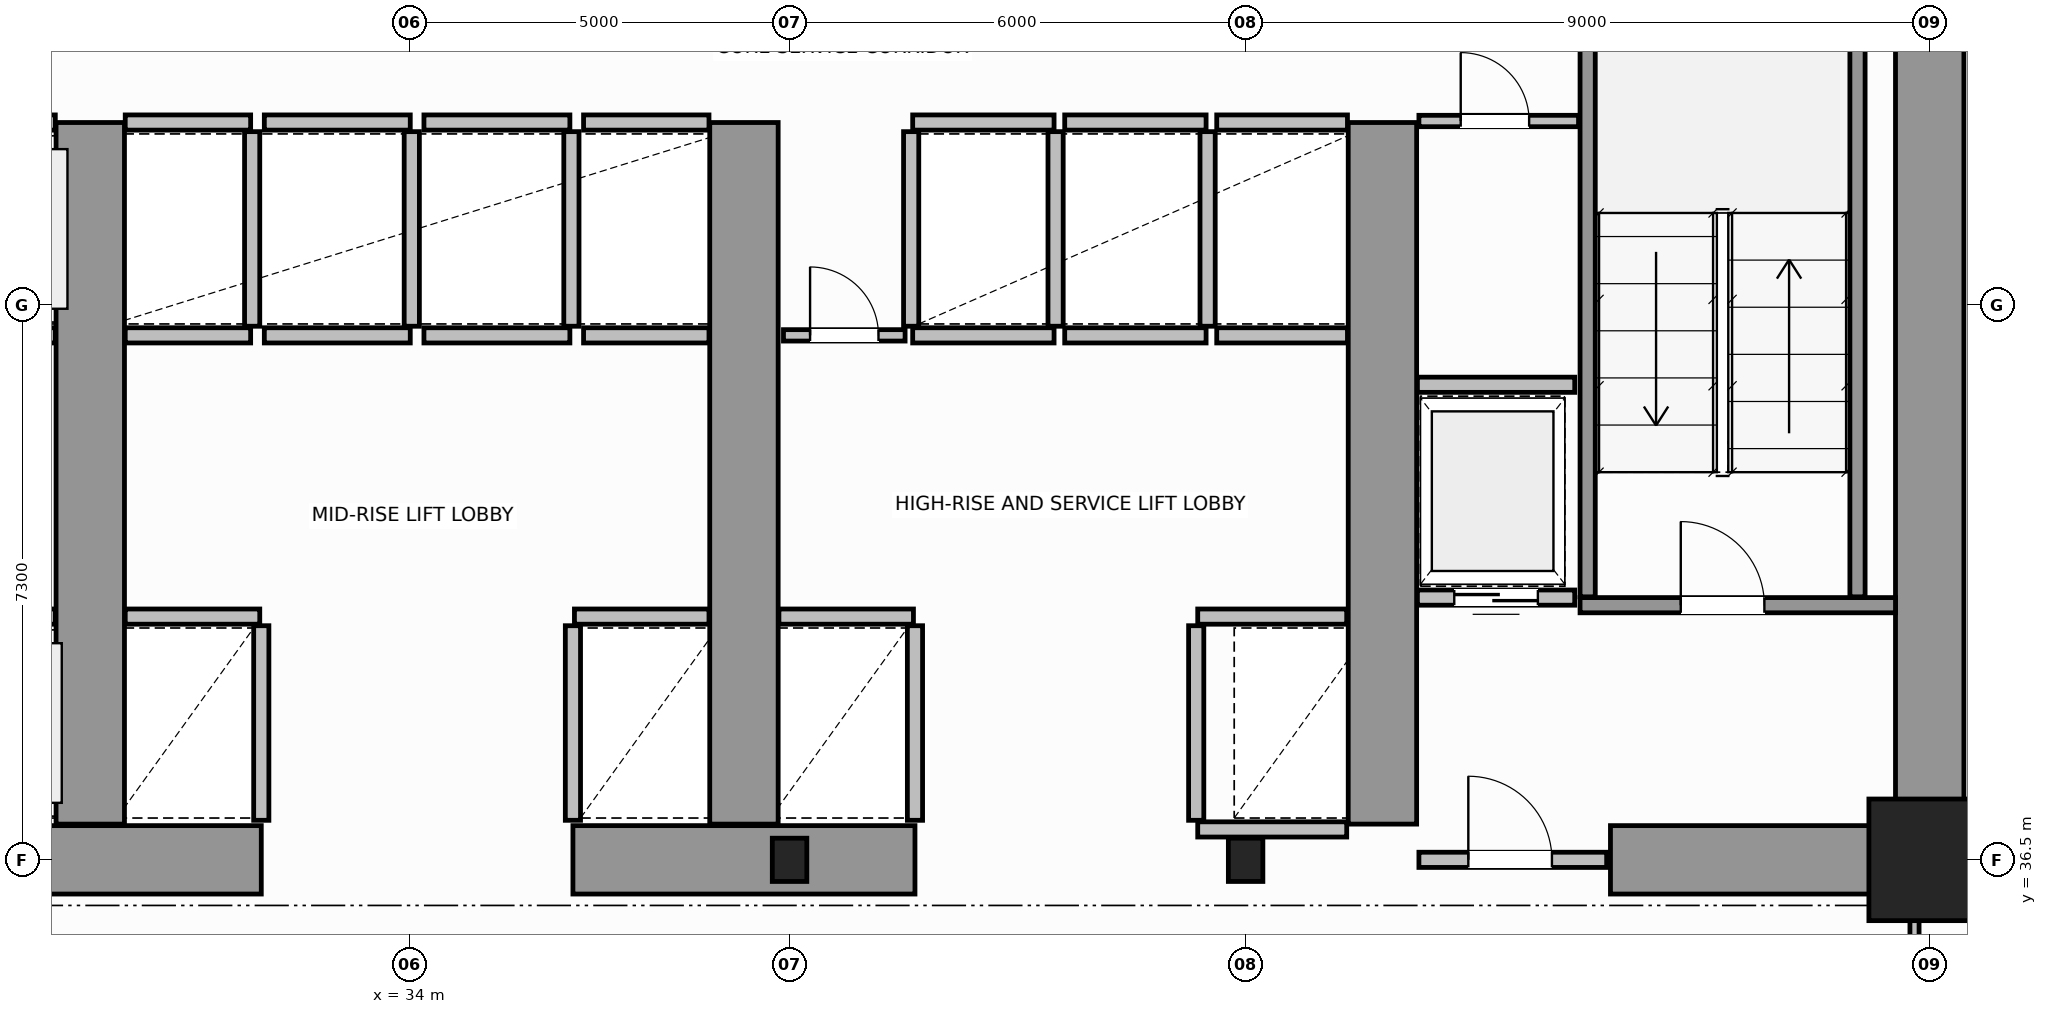
"""IFC4 building model, lengths in metres.
Left out: names, types, materials, properties, quantities, classifications, styles, units other than length and angle.
Written with IfcOpenShell. Run it as: python <this file> out.ifc"""

import sys

from ifc_helpers import new_model, si_unit, direction, frame, frame_2d, origin, origin_2d, place, context, subcontext, project, spatial, rectangle, i_section, extrude, source, transform, mapped, element, fill, save


model = new_model("IFC4")
c1 = context("Model", 3, precision=1e-05, world=origin(), true_north=direction((0.0, 1.0)))
c2 = subcontext(c1, "Body", "Model", "MODEL_VIEW")
j1 = project(units=[si_unit("LENGTHUNIT", "METRE"), si_unit("PLANEANGLEUNIT", "RADIAN")], contexts=[c1])
p1 = place(None, origin())
s1 = spatial("IfcSite", under=j1, at=p1, CompositionType="ELEMENT")
p2 = place(p1, origin())
s2 = spatial("IfcBuilding", under=s1, at=p2, CompositionType="ELEMENT")
p3 = place(p2, frame((0.0, 0.0, 56.8)))
s3 = spatial("IfcBuildingStorey", under=s2, at=p3, CompositionType="ELEMENT", Elevation=56.8)
m1 = source(origin(), c2, "Body", "SweptSolid", [
    extrude(i_section(OverallWidth=0.454, OverallDepth=0.569, WebThickness=0.078, FlangeThickness=0.08, FilletRadius=0.015, at=origin_2d()), origin(), (0.0, 0.0, 1.0), 3.8),
])
for number, where, z_axis, x_axis in (
    (1, (39.0, 36.5, 0.0), (0.0, 0.0, 1.0), (1.0, 0.0, 0.0)),
    (2, (45.0, 36.5, 0.0), (0.0, 0.0, 1.0), (1.0, 0.0, 0.0)),
):
    element("IfcColumn", number, at=place(p3, frame(where, z_axis=z_axis, x_axis=x_axis)), inside=s3, PredefinedType="COLUMN", context=c2, shape_type="MappedRepresentation", body=[
        mapped(m1, transform((0.0, 0.0, 0.0), scale=1.0)),
    ])
m2 = source(origin(), c2, "Body", "SweptSolid", [
    extrude(rectangle(XDim=1.6, YDim=1.6, at=origin_2d()), origin(), (0.0, 0.0, 1.0), 3.8),
])
p4 = place(p3, frame((54.0, 36.5, 0.0), z_axis=(0.0, 0.0, 1.0), x_axis=(1.0, 0.0, 0.0)))
e3 = element("IfcColumn", 3, at=p4, inside=s3, PredefinedType="COLUMN", context=c2, shape_type="MappedRepresentation", body=[
    mapped(m2, transform((0.0, 0.0, 0.0), scale=1.0)),
])
p5 = place(p3, frame((54.0, 36.5, 0.0), z_axis=(0.0, 0.0, 1.0), x_axis=(0.0, 1.0, 0.0)))
e4 = element("IfcWall", 4, at=p5, inside=s3, PredefinedType="SHEAR", context=c2, shape_type="SweptSolid", body=[
    extrude(rectangle(XDim=14.5, YDim=0.9, at=frame_2d((7.25, 0.0))), origin(), (0.0, 0.0, 1.0), 3.8),
])
for number, where, z_axis, x_axis in (
    (5, (27.55, 36.5, 0.0), (0.0, 0.0, 1.0), (1.0, 0.0, 0.0)),
    (6, (36.15, 36.5, 0.0), (0.0, 0.0, 1.0), (1.0, 0.0, 0.0)),
):
    element("IfcWall", number, at=place(p3, frame(where, z_axis=z_axis, x_axis=x_axis)), inside=s3, PredefinedType="SHEAR", context=c2, shape_type="SweptSolid", body=[
        extrude(rectangle(XDim=4.5, YDim=0.9, at=frame_2d((2.25, 0.0))), origin(), (0.0, 0.0, 1.0), 3.8),
    ])
p6 = place(p3, frame((49.8, 36.5, 0.0), z_axis=(0.0, 0.0, 1.0), x_axis=(1.0, 0.0, 0.0)))
e7 = element("IfcWall", 7, at=p6, inside=s3, PredefinedType="SHEAR", context=c2, shape_type="SweptSolid", body=[
    extrude(rectangle(XDim=3.73, YDim=0.9, at=frame_2d((1.865, 0.0))), origin(), (0.0, 0.0, 1.0), 2.38),
])
for number, where, z_axis, x_axis in (
    (8, (29.8, 36.97, 0.0), (0.0, 0.0, 1.0), (0.0, 1.0, 0.0)),
    (9, (38.4, 36.97, 0.0), (0.0, 0.0, 1.0), (0.0, 1.0, 0.0)),
    (10, (46.8, 36.97, 0.0), (0.0, 0.0, 1.0), (0.0, 1.0, 0.0)),
):
    element("IfcWall", number, at=place(p3, frame(where, z_axis=z_axis, x_axis=x_axis)), inside=s3, PredefinedType="SHEAR", context=c2, shape_type="SweptSolid", body=[
        extrude(rectangle(XDim=9.23, YDim=0.9, at=frame_2d((4.615, 0.0))), origin(), (0.0, 0.0, 1.0), 3.8),
    ])
p7 = place(p3, frame((49.4, 39.85, 0.0), z_axis=(0.0, 0.0, 1.0), x_axis=(1.0, 0.0, 0.0)))
e11 = element("IfcWall", 11, at=p7, inside=s3, PredefinedType="SOLIDWALL", context=c2, shape_type="SweptSolid", body=[
    extrude(rectangle(XDim=4.15, YDim=0.2, at=frame_2d((2.075, 0.0))), origin(), (0.0, 0.0, 1.0), 3.8),
])
p8 = place(p7, frame((1.325, 0.0, 0.0)))
e12 = element("IfcOpeningElement", 12, at=p8, cuts=e11, PredefinedType="OPENING", context=c2, shape_type="SweptSolid", body=[
    extrude(rectangle(XDim=1.1, YDim=2.15, at=frame_2d((0.55, 1.075))), frame((0.0, 0.11, 0.0), z_axis=(0.0, -1.0, 0.0), x_axis=(1.0, 0.0, 0.0)), (0.0, 0.0, 1.0), 0.22),
])
for number, where, z_axis, x_axis in (
    (13, (49.5, 39.96, 0.0), (0.0, 0.0, 1.0), (0.0, 1.0, 0.0)),
    (14, (53.05, 39.96, 0.0), (0.0, 0.0, 1.0), (0.0, 1.0, 0.0)),
):
    element("IfcWall", number, at=place(p3, frame(where, z_axis=z_axis, x_axis=x_axis)), inside=s3, PredefinedType="SOLIDWALL", context=c2, shape_type="SweptSolid", body=[
        extrude(rectangle(XDim=9.93, YDim=0.2, at=frame_2d((4.965, 0.0))), origin(), (0.0, 0.0, 1.0), 3.8),
    ])
p9 = place(p3, frame((47.28, 36.5, 0.0), z_axis=(0.0, 0.0, 1.0), x_axis=(1.0, 0.0, 0.0)))
e15 = element("IfcWall", 15, at=p9, inside=s3, PredefinedType="SOLIDWALL", context=c2, shape_type="SweptSolid", body=[
    extrude(rectangle(XDim=2.47, YDim=0.2, at=frame_2d((1.235, 0.0))), origin(), (0.0, 0.0, 1.0), 2.37),
])
p10 = place(p9, frame((0.65, 0.0, 0.0)))
e16 = element("IfcOpeningElement", 16, at=p10, cuts=e15, PredefinedType="OPENING", context=c2, shape_type="SweptSolid", body=[
    extrude(rectangle(XDim=1.1, YDim=2.15, at=frame_2d((0.55, 1.075))), frame((0.0, 0.11, 0.0), z_axis=(0.0, -1.0, 0.0), x_axis=(1.0, 0.0, 0.0)), (0.0, 0.0, 1.0), 0.22),
])
p11 = place(p3, frame((27.57, 39.7, 0.0), z_axis=(0.0, 0.0, 1.0), x_axis=(1.0, 0.0, 0.0)))
e17 = element("IfcWall", 17, at=p11, inside=s3, PredefinedType="SOLIDWALL", context=c2, shape_type="SweptSolid", body=[
    extrude(rectangle(XDim=1.77, YDim=0.2, at=frame_2d((0.885, 0.0))), origin(), (0.0, 0.0, 1.0), 3.58),
])
p12 = place(p11, frame((0.335, 0.0, 0.0)))
e18 = element("IfcOpeningElement", 18, at=p12, cuts=e17, PredefinedType="OPENING", context=c2, shape_type="SweptSolid", body=[
    extrude(rectangle(XDim=1.1, YDim=2.15, at=frame_2d((0.55, 1.075))), frame((0.0, 0.11, 0.0), z_axis=(0.0, -1.0, 0.0), x_axis=(1.0, 0.0, 0.0)), (0.0, 0.0, 1.0), 0.22),
])
p13 = place(p3, frame((27.69, 43.4, 0.0), z_axis=(0.0, 0.0, 1.0), x_axis=(1.0, 0.0, 0.0)))
e19 = element("IfcWall", 19, at=p13, inside=s3, PredefinedType="SOLIDWALL", context=c2, shape_type="SweptSolid", body=[
    extrude(rectangle(XDim=1.65, YDim=0.2, at=frame_2d((0.825, 0.0))), origin(), (0.0, 0.0, 1.0), 3.58),
])
p14 = place(p13, frame((0.275, 0.0, 0.0)))
e20 = element("IfcOpeningElement", 20, at=p14, cuts=e19, PredefinedType="OPENING", context=c2, shape_type="SweptSolid", body=[
    extrude(rectangle(XDim=1.1, YDim=2.15, at=frame_2d((0.55, 1.075))), frame((0.0, 0.11, 0.0), z_axis=(0.0, -1.0, 0.0), x_axis=(1.0, 0.0, 0.0)), (0.0, 0.0, 1.0), 0.22),
])
p15 = place(p3, frame((27.69, 46.2, 0.0), z_axis=(0.0, 0.0, 1.0), x_axis=(1.0, 0.0, 0.0)))
e21 = element("IfcWall", 21, at=p15, inside=s3, PredefinedType="SOLIDWALL", context=c2, shape_type="SweptSolid", body=[
    extrude(rectangle(XDim=1.65, YDim=0.2, at=frame_2d((0.825, 0.0))), origin(), (0.0, 0.0, 1.0), 3.58),
])
p16 = place(p3, frame((30.26, 39.7, 0.0), z_axis=(0.0, 0.0, 1.0), x_axis=(1.0, 0.0, 0.0)))
e22 = element("IfcWall", 22, at=p16, inside=s3, PredefinedType="SOLIDWALL", context=c2, shape_type="SweptSolid", body=[
    extrude(rectangle(XDim=1.77, YDim=0.2, at=frame_2d((0.885, 0.0))), origin(), (0.0, 0.0, 1.0), 3.58),
])
p17 = place(p3, frame((32.05, 37.02, 0.0), z_axis=(0.0, 0.0, 1.0), x_axis=(0.0, 1.0, 0.0)))
e23 = element("IfcWall", 23, at=p17, inside=s3, PredefinedType="SOLIDWALL", context=c2, shape_type="SweptSolid", body=[
    extrude(rectangle(XDim=2.56, YDim=0.2, at=frame_2d((1.28, 0.0))), origin(), (0.0, 0.0, 1.0), 3.58),
])
p18 = place(p3, frame((36.17, 39.7, 0.0), z_axis=(0.0, 0.0, 1.0), x_axis=(1.0, 0.0, 0.0)))
e24 = element("IfcWall", 24, at=p18, inside=s3, PredefinedType="SOLIDWALL", context=c2, shape_type="SweptSolid", body=[
    extrude(rectangle(XDim=1.77, YDim=0.2, at=frame_2d((0.885, 0.0))), origin(), (0.0, 0.0, 1.0), 3.58),
])
p19 = place(p3, frame((36.15, 37.02, 0.0), z_axis=(0.0, 0.0, 1.0), x_axis=(0.0, 1.0, 0.0)))
e25 = element("IfcWall", 25, at=p19, inside=s3, PredefinedType="SOLIDWALL", context=c2, shape_type="SweptSolid", body=[
    extrude(rectangle(XDim=2.56, YDim=0.2, at=frame_2d((1.28, 0.0))), origin(), (0.0, 0.0, 1.0), 3.58),
])
for number, where, z_axis, x_axis in (
    (26, (30.26, 43.4, 0.0), (0.0, 0.0, 1.0), (1.0, 0.0, 0.0)),
    (27, (30.26, 46.2, 0.0), (0.0, 0.0, 1.0), (1.0, 0.0, 0.0)),
):
    element("IfcWall", number, at=place(p3, frame(where, z_axis=z_axis, x_axis=x_axis)), inside=s3, PredefinedType="SOLIDWALL", context=c2, shape_type="SweptSolid", body=[
        extrude(rectangle(XDim=1.65, YDim=0.2, at=frame_2d((0.825, 0.0))), origin(), (0.0, 0.0, 1.0), 3.58),
    ])
p20 = place(p3, frame((31.93, 43.52, 0.0), z_axis=(0.0, 0.0, 1.0), x_axis=(0.0, 1.0, 0.0)))
e28 = element("IfcWall", 28, at=p20, inside=s3, PredefinedType="SOLIDWALL", context=c2, shape_type="SweptSolid", body=[
    extrude(rectangle(XDim=2.56, YDim=0.2, at=frame_2d((1.28, 0.0))), origin(), (0.0, 0.0, 1.0), 3.58),
])
for number, where, z_axis, x_axis in (
    (29, (32.09, 43.4, 0.0), (0.0, 0.0, 1.0), (1.0, 0.0, 0.0)),
    (30, (32.09, 46.2, 0.0), (0.0, 0.0, 1.0), (1.0, 0.0, 0.0)),
):
    element("IfcWall", number, at=place(p3, frame(where, z_axis=z_axis, x_axis=x_axis)), inside=s3, PredefinedType="SOLIDWALL", context=c2, shape_type="SweptSolid", body=[
        extrude(rectangle(XDim=1.92, YDim=0.2, at=frame_2d((0.96, 0.0))), origin(), (0.0, 0.0, 1.0), 3.58),
    ])
p21 = place(p3, frame((34.03, 43.52, 0.0), z_axis=(0.0, 0.0, 1.0), x_axis=(0.0, 1.0, 0.0)))
e31 = element("IfcWall", 31, at=p21, inside=s3, PredefinedType="SOLIDWALL", context=c2, shape_type="SweptSolid", body=[
    extrude(rectangle(XDim=2.56, YDim=0.2, at=frame_2d((1.28, 0.0))), origin(), (0.0, 0.0, 1.0), 3.58),
])
for number, where, z_axis, x_axis in (
    (32, (34.19, 43.4, 0.0), (0.0, 0.0, 1.0), (1.0, 0.0, 0.0)),
    (33, (34.19, 46.2, 0.0), (0.0, 0.0, 1.0), (1.0, 0.0, 0.0)),
):
    element("IfcWall", number, at=place(p3, frame(where, z_axis=z_axis, x_axis=x_axis)), inside=s3, PredefinedType="SOLIDWALL", context=c2, shape_type="SweptSolid", body=[
        extrude(rectangle(XDim=1.92, YDim=0.2, at=frame_2d((0.96, 0.0))), origin(), (0.0, 0.0, 1.0), 3.58),
    ])
p22 = place(p3, frame((36.13, 43.52, 0.0), z_axis=(0.0, 0.0, 1.0), x_axis=(0.0, 1.0, 0.0)))
e34 = element("IfcWall", 34, at=p22, inside=s3, PredefinedType="SOLIDWALL", context=c2, shape_type="SweptSolid", body=[
    extrude(rectangle(XDim=2.56, YDim=0.2, at=frame_2d((1.28, 0.0))), origin(), (0.0, 0.0, 1.0), 3.58),
])
for number, where, z_axis, x_axis in (
    (35, (36.29, 43.4, 0.0), (0.0, 0.0, 1.0), (1.0, 0.0, 0.0)),
    (36, (36.29, 46.2, 0.0), (0.0, 0.0, 1.0), (1.0, 0.0, 0.0)),
):
    element("IfcWall", number, at=place(p3, frame(where, z_axis=z_axis, x_axis=x_axis)), inside=s3, PredefinedType="SOLIDWALL", context=c2, shape_type="SweptSolid", body=[
        extrude(rectangle(XDim=1.65, YDim=0.2, at=frame_2d((0.825, 0.0))), origin(), (0.0, 0.0, 1.0), 3.58),
    ])
p23 = place(p3, frame((38.86, 39.7, 0.0), z_axis=(0.0, 0.0, 1.0), x_axis=(1.0, 0.0, 0.0)))
e37 = element("IfcWall", 37, at=p23, inside=s3, PredefinedType="SOLIDWALL", context=c2, shape_type="SweptSolid", body=[
    extrude(rectangle(XDim=1.77, YDim=0.2, at=frame_2d((0.885, 0.0))), origin(), (0.0, 0.0, 1.0), 3.58),
])
p24 = place(p3, frame((40.65, 37.02, 0.0), z_axis=(0.0, 0.0, 1.0), x_axis=(0.0, 1.0, 0.0)))
e38 = element("IfcWall", 38, at=p24, inside=s3, PredefinedType="SOLIDWALL", context=c2, shape_type="SweptSolid", body=[
    extrude(rectangle(XDim=2.56, YDim=0.2, at=frame_2d((1.28, 0.0))), origin(), (0.0, 0.0, 1.0), 3.58),
])
p25 = place(p3, frame((44.37, 39.7, 0.0), z_axis=(0.0, 0.0, 1.0), x_axis=(1.0, 0.0, 0.0)))
e39 = element("IfcWall", 39, at=p25, inside=s3, PredefinedType="SOLIDWALL", context=c2, shape_type="SweptSolid", body=[
    extrude(rectangle(XDim=1.96, YDim=0.2, at=frame_2d((0.98, 0.0))), origin(), (0.0, 0.0, 1.0), 3.58),
])
p26 = place(p3, frame((44.37, 36.9, 0.0), z_axis=(0.0, 0.0, 1.0), x_axis=(1.0, 0.0, 0.0)))
e40 = element("IfcWall", 40, at=p26, inside=s3, PredefinedType="SOLIDWALL", context=c2, shape_type="SweptSolid", body=[
    extrude(rectangle(XDim=1.96, YDim=0.2, at=frame_2d((0.98, 0.0))), origin(), (0.0, 0.0, 1.0), 2.37),
])
p27 = place(p3, frame((44.35, 37.02, 0.0), z_axis=(0.0, 0.0, 1.0), x_axis=(0.0, 1.0, 0.0)))
e41 = element("IfcWall", 41, at=p27, inside=s3, PredefinedType="SOLIDWALL", context=c2, shape_type="SweptSolid", body=[
    extrude(rectangle(XDim=2.56, YDim=0.2, at=frame_2d((1.28, 0.0))), origin(), (0.0, 0.0, 1.0), 3.58),
])
for number, where, z_axis, x_axis in (
    (42, (40.62, 43.4, 0.0), (0.0, 0.0, 1.0), (1.0, 0.0, 0.0)),
    (43, (40.62, 46.2, 0.0), (0.0, 0.0, 1.0), (1.0, 0.0, 0.0)),
):
    element("IfcWall", number, at=place(p3, frame(where, z_axis=z_axis, x_axis=x_axis)), inside=s3, PredefinedType="SOLIDWALL", context=c2, shape_type="SweptSolid", body=[
        extrude(rectangle(XDim=1.86, YDim=0.2, at=frame_2d((0.93, 0.0))), origin(), (0.0, 0.0, 1.0), 3.58),
    ])
for number, where, z_axis, x_axis in (
    (44, (40.6, 43.52, 0.0), (0.0, 0.0, 1.0), (0.0, 1.0, 0.0)),
    (45, (42.5, 43.52, 0.0), (0.0, 0.0, 1.0), (0.0, 1.0, 0.0)),
):
    element("IfcWall", number, at=place(p3, frame(where, z_axis=z_axis, x_axis=x_axis)), inside=s3, PredefinedType="SOLIDWALL", context=c2, shape_type="SweptSolid", body=[
        extrude(rectangle(XDim=2.56, YDim=0.2, at=frame_2d((1.28, 0.0))), origin(), (0.0, 0.0, 1.0), 3.58),
    ])
for number, where, z_axis, x_axis in (
    (46, (42.62, 43.4, 0.0), (0.0, 0.0, 1.0), (1.0, 0.0, 0.0)),
    (47, (42.62, 46.2, 0.0), (0.0, 0.0, 1.0), (1.0, 0.0, 0.0)),
):
    element("IfcWall", number, at=place(p3, frame(where, z_axis=z_axis, x_axis=x_axis)), inside=s3, PredefinedType="SOLIDWALL", context=c2, shape_type="SweptSolid", body=[
        extrude(rectangle(XDim=1.86, YDim=0.2, at=frame_2d((0.93, 0.0))), origin(), (0.0, 0.0, 1.0), 3.58),
    ])
p28 = place(p3, frame((44.5, 43.52, 0.0), z_axis=(0.0, 0.0, 1.0), x_axis=(0.0, 1.0, 0.0)))
e48 = element("IfcWall", 48, at=p28, inside=s3, PredefinedType="SOLIDWALL", context=c2, shape_type="SweptSolid", body=[
    extrude(rectangle(XDim=2.56, YDim=0.2, at=frame_2d((1.28, 0.0))), origin(), (0.0, 0.0, 1.0), 3.58),
])
for number, where, z_axis, x_axis in (
    (49, (44.62, 43.4, 0.0), (0.0, 0.0, 1.0), (1.0, 0.0, 0.0)),
    (50, (44.62, 46.2, 0.0), (0.0, 0.0, 1.0), (1.0, 0.0, 0.0)),
):
    element("IfcWall", number, at=place(p3, frame(where, z_axis=z_axis, x_axis=x_axis)), inside=s3, PredefinedType="SOLIDWALL", context=c2, shape_type="SweptSolid", body=[
        extrude(rectangle(XDim=1.72, YDim=0.2, at=frame_2d((0.86, 0.0))), origin(), (0.0, 0.0, 1.0), 3.58),
    ])
p29 = place(p3, frame((47.26, 39.95, 0.0), z_axis=(0.0, 0.0, 1.0), x_axis=(1.0, 0.0, 0.0)))
e51 = element("IfcWall", 51, at=p29, inside=s3, PredefinedType="SOLIDWALL", context=c2, shape_type="SweptSolid", body=[
    extrude(rectangle(XDim=2.07, YDim=0.2, at=frame_2d((1.035, 0.0))), origin(), (0.0, 0.0, 1.0), 3.58),
])
p30 = place(p29, frame((0.485, 0.0, 0.0)))
e52 = element("IfcOpeningElement", 52, at=p30, cuts=e51, PredefinedType="OPENING", context=c2, shape_type="SweptSolid", body=[
    extrude(rectangle(XDim=1.1, YDim=2.15, at=frame_2d((0.55, 1.075))), frame((0.0, 0.11, 0.0), z_axis=(0.0, -1.0, 0.0), x_axis=(1.0, 0.0, 0.0)), (0.0, 0.0, 1.0), 0.22),
])
p31 = place(p3, frame((47.26, 42.75, 0.0), z_axis=(0.0, 0.0, 1.0), x_axis=(1.0, 0.0, 0.0)))
e53 = element("IfcWall", 53, at=p31, inside=s3, PredefinedType="SOLIDWALL", context=c2, shape_type="SweptSolid", body=[
    extrude(rectangle(XDim=2.07, YDim=0.2, at=frame_2d((1.035, 0.0))), origin(), (0.0, 0.0, 1.0), 3.58),
])
p32 = place(p3, frame((47.28, 46.22, 0.0), z_axis=(0.0, 0.0, 1.0), x_axis=(1.0, 0.0, 0.0)))
e54 = element("IfcWall", 54, at=p32, inside=s3, PredefinedType="PARTITIONING", context=c2, shape_type="SweptSolid", body=[
    extrude(rectangle(XDim=2.1, YDim=0.15, at=frame_2d((1.05, 0.0))), origin(), (0.0, 0.0, 1.0), 3.58),
])
p33 = place(p32, frame((0.55, 0.0, 0.0)))
e55 = element("IfcOpeningElement", 55, at=p33, cuts=e54, PredefinedType="OPENING", context=c2, shape_type="SweptSolid", body=[
    extrude(rectangle(XDim=0.9, YDim=2.1, at=frame_2d((0.45, 1.05))), frame((0.0, 0.085, 0.0), z_axis=(0.0, -1.0, 0.0), x_axis=(1.0, 0.0, 0.0)), (0.0, 0.0, 1.0), 0.17),
])
p34 = place(p3, frame((38.92, 43.4, 0.0), z_axis=(0.0, 0.0, 1.0), x_axis=(1.0, 0.0, 0.0)))
e56 = element("IfcWall", 56, at=p34, inside=s3, PredefinedType="PARTITIONING", context=c2, shape_type="SweptSolid", body=[
    extrude(rectangle(XDim=1.6, YDim=0.15, at=frame_2d((0.8, 0.0))), origin(), (0.0, 0.0, 1.0), 3.58),
])
p35 = place(p34, frame((0.35, 0.0, 0.0)))
e57 = element("IfcOpeningElement", 57, at=p35, cuts=e56, PredefinedType="OPENING", context=c2, shape_type="SweptSolid", body=[
    extrude(rectangle(XDim=0.9, YDim=2.1, at=frame_2d((0.45, 1.05))), frame((0.0, 0.085, 0.0), z_axis=(0.0, -1.0, 0.0), x_axis=(1.0, 0.0, 0.0)), (0.0, 0.0, 1.0), 0.17),
])
p36 = place(p3, frame((53.8, 34.16, 0.0), z_axis=(0.0, 0.0, 1.0), x_axis=(0.0, 1.0, 0.0)))
e58 = element("IfcWall", 58, at=p36, inside=s3, PredefinedType="PARTITIONING", context=c2, shape_type="SweptSolid", body=[
    extrude(rectangle(XDim=2.28, YDim=0.12, at=frame_2d((1.14, 0.0))), origin(), (0.0, 0.0, 1.0), 3.58),
])
p37 = place(p36, frame((0.3, 0.0, 0.0)))
e59 = element("IfcOpeningElement", 59, at=p37, cuts=e58, PredefinedType="OPENING", context=c2, shape_type="SweptSolid", body=[
    extrude(rectangle(XDim=0.9, YDim=2.15, at=frame_2d((0.45, 1.075))), frame((0.0, 0.07, 0.0), z_axis=(0.0, -1.0, 0.0), x_axis=(1.0, 0.0, 0.0)), (0.0, 0.0, 1.0), 0.14),
])
m3 = source(origin(), c2, "Body", "SweptSolid", [
    extrude(rectangle(XDim=1.1, YDim=2.15, at=frame_2d((0.55, 1.075))), frame((0.0, 0.025, 0.0), z_axis=(0.0, -1.0, 0.0), x_axis=(1.0, 0.0, 0.0)), (0.0, 0.0, 1.0), 0.05),
])
p38 = place(p8, origin())
e60 = element("IfcDoor", 60, at=p38, inside=s3, OperationType="SINGLE_SWING_RIGHT", PredefinedType="DOOR", context=c2, shape_type="MappedRepresentation", body=[
    mapped(m3, transform((0.0, 0.0, 0.0), scale=1.0)),
])
fill(e12, e60)
p39 = place(p10, origin())
e61 = element("IfcDoor", 61, at=p39, inside=s3, OperationType="SINGLE_SWING_LEFT", PredefinedType="DOOR", context=c2, shape_type="MappedRepresentation", body=[
    mapped(m3, transform((0.0, 0.0, 0.0), scale=1.0)),
])
fill(e16, e61)
p40 = place(p30, origin())
e62 = element("IfcDoor", 62, at=p40, inside=s3, OperationType="DOUBLE_DOOR_SLIDING", PredefinedType="DOOR", context=c2, shape_type="MappedRepresentation", body=[
    mapped(m3, transform((0.0, 0.0, 0.0), scale=1.0)),
])
fill(e52, e62)
m4 = source(origin(), c2, "Body", "SweptSolid", [
    extrude(rectangle(XDim=0.9, YDim=2.1, at=frame_2d((0.45, 1.05))), frame((0.0, 0.025, 0.0), z_axis=(0.0, -1.0, 0.0), x_axis=(1.0, 0.0, 0.0)), (0.0, 0.0, 1.0), 0.05),
])
p41 = place(p33, origin())
e63 = element("IfcDoor", 63, at=p41, inside=s3, OperationType="SINGLE_SWING_RIGHT", PredefinedType="DOOR", context=c2, shape_type="MappedRepresentation", body=[
    mapped(m4, transform((0.0, 0.0, 0.0), scale=1.0)),
])
fill(e55, e63)
p42 = place(p35, origin())
e64 = element("IfcDoor", 64, at=p42, inside=s3, OperationType="SINGLE_SWING_LEFT", PredefinedType="DOOR", context=c2, shape_type="MappedRepresentation", body=[
    mapped(m4, transform((0.0, 0.0, 0.0), scale=1.0)),
])
fill(e57, e64)
save(model, sys.argv[1])
